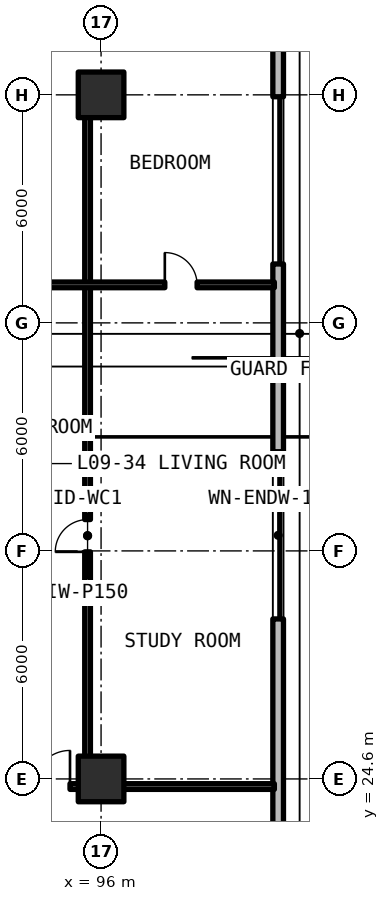
"""IFC4 building model, lengths in metres.
Left out: names, types, materials, properties, quantities, classifications, styles, units other than length and angle.
Written with IfcOpenShell. Run it as: python <this file> out.ifc"""

import sys

from ifc_helpers import new_model, si_unit, direction, frame, frame_2d, origin, origin_2d, place, context, subcontext, project, spatial, rectangle, extrude, element, fill, save


model = new_model("IFC4")
c1 = context("Model", 3, precision=1e-05, world=origin(), true_north=direction((0.0, 1.0)))
c2 = subcontext(c1, "Body", "Model", "MODEL_VIEW")
j1 = project(units=[si_unit("LENGTHUNIT", "METRE"), si_unit("PLANEANGLEUNIT", "RADIAN")], contexts=[c1])
p1 = place(None, origin())
s1 = spatial("IfcSite", under=j1, at=p1, CompositionType="ELEMENT")
p2 = place(p1, origin())
s2 = spatial("IfcBuilding", under=s1, at=p2, CompositionType="ELEMENT")
p3 = place(p2, frame((0.0, 0.0, 35.64)))
s3 = spatial("IfcBuildingStorey", under=s2, at=p3, CompositionType="ELEMENT", Elevation=35.64)
for number, where, z_axis, x_axis in (
    (1, (96.0, 24.6, 0.0), (0.0, 0.0, 1.0), (1.0, 0.0, 0.0)),
    (2, (96.0, 42.6, 0.0), (0.0, 0.0, 1.0), (1.0, 0.0, 0.0)),
):
    element("IfcColumn", number, at=place(p3, frame(where, z_axis=z_axis, x_axis=x_axis)), inside=s3, PredefinedType="COLUMN", context=c2, shape_type="SweptSolid", body=[
        extrude(rectangle(XDim=1.2, YDim=1.2, at=origin_2d()), origin(), (0.0, 0.0, 1.0), 3.3),
    ])
p4 = place(p3, frame((100.66, 11.858, 0.0), z_axis=(0.0, 0.0, 1.0), x_axis=(0.0, 1.0, 0.0)))
e3 = element("IfcWall", 3, at=p4, inside=s3, PredefinedType="SOLIDWALL", context=c2, shape_type="SweptSolid", body=[
    extrude(rectangle(XDim=43.484, YDim=0.28, at=frame_2d((21.742, 0.0))), origin(), (0.0, 0.0, 1.0), 3.08),
])
p5 = place(p4, frame((3.442, 0.0, 0.0)))
e4 = element("IfcOpeningElement", 4, at=p5, cuts=e3, PredefinedType="OPENING", context=c2, shape_type="SweptSolid", body=[
    extrude(rectangle(XDim=1.1, YDim=2.15, at=frame_2d((0.55, 1.075))), frame((0.0, 0.15, 0.0), z_axis=(0.0, -1.0, 0.0), x_axis=(1.0, 0.0, 0.0)), (0.0, 0.0, 1.0), 0.3),
])
p6 = place(p4, frame((16.952, 0.0, 0.78)))
e5 = element("IfcOpeningElement", 5, at=p6, cuts=e3, PredefinedType="OPENING", context=c2, shape_type="SweptSolid", body=[
    extrude(rectangle(XDim=4.4, YDim=1.66, at=frame_2d((2.2, 0.83))), frame((0.0, 0.15, 0.0), z_axis=(0.0, -1.0, 0.0), x_axis=(1.0, 0.0, 0.0)), (0.0, 0.0, 1.0), 0.3),
])
p7 = place(p4, frame((26.292, 0.0, 0.78)))
e6 = element("IfcOpeningElement", 6, at=p7, cuts=e3, PredefinedType="OPENING", context=c2, shape_type="SweptSolid", body=[
    extrude(rectangle(XDim=4.4, YDim=1.66, at=frame_2d((2.2, 0.83))), frame((0.0, 0.15, 0.0), z_axis=(0.0, -1.0, 0.0), x_axis=(1.0, 0.0, 0.0)), (0.0, 0.0, 1.0), 0.3),
])
p8 = place(p3, frame((95.645, 24.4, 0.0), z_axis=(0.0, 0.0, 1.0), x_axis=(0.0, 1.0, 0.0)))
e7 = element("IfcWall", 7, at=p8, inside=s3, PredefinedType="PARTITIONING", context=c2, shape_type="SweptSolid", body=[
    extrude(rectangle(XDim=13.2, YDim=0.15, at=frame_2d((6.6, 0.0))), origin(), (0.0, 0.0, 1.0), 2.35),
])
p9 = place(p8, frame((6.175, 0.0, 0.0)))
e8 = element("IfcOpeningElement", 8, at=p9, cuts=e7, PredefinedType="OPENING", context=c2, shape_type="SweptSolid", body=[
    extrude(rectangle(XDim=0.85, YDim=2.1, at=frame_2d((0.425, 1.05))), frame((0.0, 0.085, 0.0), z_axis=(0.0, -1.0, 0.0), x_axis=(1.0, 0.0, 0.0)), (0.0, 0.0, 1.0), 0.17),
])
p10 = place(p3, frame((95.645, 37.6, 0.0), z_axis=(0.0, 0.0, 1.0), x_axis=(0.0, 1.0, 0.0)))
e9 = element("IfcWall", 9, at=p10, inside=s3, PredefinedType="PARTITIONING", context=c2, shape_type="SweptSolid", body=[
    extrude(rectangle(XDim=5.2, YDim=0.15, at=frame_2d((2.6, 0.0))), origin(), (0.0, 0.0, 1.0), 2.35),
])
p11 = place(p3, frame((90.32, 37.6, 0.0), z_axis=(0.0, 0.0, 1.0), x_axis=(1.0, 0.0, 0.0)))
e10 = element("IfcWall", 10, at=p11, inside=s3, PredefinedType="PARTITIONING", context=c2, shape_type="SweptSolid", body=[
    extrude(rectangle(XDim=10.24, YDim=0.15, at=frame_2d((5.12, 0.0))), origin(), (0.0, 0.0, 1.0), 2.35),
])
p12 = place(p11, frame((3.412, 0.0, 0.0)))
e11 = element("IfcOpeningElement", 11, at=p12, cuts=e10, PredefinedType="OPENING", context=c2, shape_type="SweptSolid", body=[
    extrude(rectangle(XDim=0.85, YDim=2.1, at=frame_2d((0.425, 1.05))), frame((0.0, 0.085, 0.0), z_axis=(0.0, -1.0, 0.0), x_axis=(1.0, 0.0, 0.0)), (0.0, 0.0, 1.0), 0.17),
])
p13 = place(p11, frame((7.357, 0.0, 0.0)))
e12 = element("IfcOpeningElement", 12, at=p13, cuts=e10, PredefinedType="OPENING", context=c2, shape_type="SweptSolid", body=[
    extrude(rectangle(XDim=0.85, YDim=2.1, at=frame_2d((0.425, 1.05))), frame((0.0, 0.085, 0.0), z_axis=(0.0, -1.0, 0.0), x_axis=(1.0, 0.0, 0.0)), (0.0, 0.0, 1.0), 0.17),
])
p14 = place(p3, frame((90.32, 24.4, 0.0), z_axis=(0.0, 0.0, 1.0), x_axis=(1.0, 0.0, 0.0)))
e13 = element("IfcWall", 13, at=p14, inside=s3, PredefinedType="SOLIDWALL", context=c2, shape_type="SweptSolid", body=[
    extrude(rectangle(XDim=10.24, YDim=0.15, at=frame_2d((5.12, 0.0))), origin(), (0.0, 0.0, 1.0), 2.295),
])
p15 = place(p14, frame((3.913, 0.0, 0.0)))
e14 = element("IfcOpeningElement", 14, at=p15, cuts=e13, PredefinedType="OPENING", context=c2, shape_type="SweptSolid", body=[
    extrude(rectangle(XDim=0.95, YDim=2.15, at=frame_2d((0.475, 1.075))), frame((0.0, 0.085, 0.0), z_axis=(0.0, -1.0, 0.0), x_axis=(1.0, 0.0, 0.0)), (0.0, 0.0, 1.0), 0.17),
])
p16 = place(p6, origin())
e15 = element("IfcWindow", 15, at=p16, inside=s3, PartitioningType="SINGLE_PANEL", PredefinedType="WINDOW", context=c2, shape_type="SweptSolid", body=[
    extrude(rectangle(XDim=4.4, YDim=1.66, at=frame_2d((2.2, 0.83))), frame((0.0, 0.03, 0.0), z_axis=(0.0, -1.0, 0.0), x_axis=(1.0, 0.0, 0.0)), (0.0, 0.0, 1.0), 0.06),
])
fill(e5, e15)
p17 = place(p7, origin())
e16 = element("IfcWindow", 16, at=p17, inside=s3, PartitioningType="SINGLE_PANEL", PredefinedType="WINDOW", context=c2, shape_type="SweptSolid", body=[
    extrude(rectangle(XDim=4.4, YDim=1.66, at=frame_2d((2.2, 0.83))), frame((0.0, 0.03, 0.0), z_axis=(0.0, -1.0, 0.0), x_axis=(1.0, 0.0, 0.0)), (0.0, 0.0, 1.0), 0.06),
])
fill(e6, e16)
p18 = place(p9, origin())
e17 = element("IfcDoor", 17, at=p18, inside=s3, OperationType="SINGLE_SWING_LEFT", PredefinedType="DOOR", context=c2, shape_type="SweptSolid", body=[
    extrude(rectangle(XDim=0.85, YDim=2.1, at=frame_2d((0.425, 1.05))), frame((0.0, 0.025, 0.0), z_axis=(0.0, -1.0, 0.0), x_axis=(1.0, 0.0, 0.0)), (0.0, 0.0, 1.0), 0.05),
])
fill(e8, e17)
p19 = place(p13, origin())
e18 = element("IfcDoor", 18, at=p19, inside=s3, OperationType="SINGLE_SWING_LEFT", PredefinedType="DOOR", context=c2, shape_type="SweptSolid", body=[
    extrude(rectangle(XDim=0.85, YDim=2.1, at=frame_2d((0.425, 1.05))), frame((0.0, 0.025, 0.0), z_axis=(0.0, -1.0, 0.0), x_axis=(1.0, 0.0, 0.0)), (0.0, 0.0, 1.0), 0.05),
])
fill(e12, e18)
p20 = place(p15, origin())
e19 = element("IfcDoor", 19, at=p20, inside=s3, OperationType="SINGLE_SWING_RIGHT", PredefinedType="DOOR", context=c2, shape_type="SweptSolid", body=[
    extrude(rectangle(XDim=0.95, YDim=2.15, at=frame_2d((0.475, 1.075))), frame((0.0, 0.025, 0.0), z_axis=(0.0, -1.0, 0.0), x_axis=(1.0, 0.0, 0.0)), (0.0, 0.0, 1.0), 0.05),
])
fill(e14, e19)
save(model, sys.argv[1])
